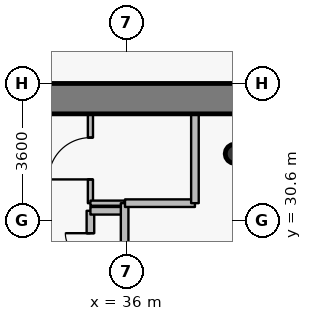
"""IFC4 building model, lengths in metres.
Left out: names, types, materials, properties, quantities, classifications, styles, units other than length and angle.
Written with IfcOpenShell. Run it as: python <this file> out.ifc"""

import sys

from ifc_helpers import new_model, si_unit, direction, frame, frame_2d, origin, origin_2d, place, context, subcontext, project, spatial, rectangle, hollow_circle, extrude, source, transform, mapped, element, fill, save


model = new_model("IFC4")
c1 = context("Model", 3, precision=1e-05, world=origin(), true_north=direction((0.0, 1.0)))
c2 = subcontext(c1, "Body", "Model", "MODEL_VIEW")
j1 = project(units=[si_unit("LENGTHUNIT", "METRE"), si_unit("PLANEANGLEUNIT", "RADIAN")], contexts=[c1])
p1 = place(None, origin())
s1 = spatial("IfcSite", under=j1, at=p1, CompositionType="ELEMENT")
p2 = place(p1, origin())
s2 = spatial("IfcBuilding", under=s1, at=p2, CompositionType="ELEMENT")
p3 = place(p2, frame((0.0, 0.0, 119.7)))
s3 = spatial("IfcBuildingStorey", under=s2, at=p3, CompositionType="ELEMENT", Elevation=119.7)
p4 = place(p3, frame((38.85, 32.35, 0.0), z_axis=(0.0, 0.0, 1.0), x_axis=(1.0, 0.0, 0.0)))
e1 = element("IfcColumn", 1, at=p4, inside=s3, PredefinedType="COLUMN", context=c2, shape_type="SweptSolid", body=[
    extrude(hollow_circle(Radius=0.254, WallThickness=0.02, at=origin_2d()), origin(), (0.0, 0.0, 1.0), 3.75),
])
p5 = place(p3, frame((26.6, 33.8, 0.0), z_axis=(0.0, 0.0, 1.0), x_axis=(1.0, 0.0, 0.0)))
e2 = element("IfcWall", 2, at=p5, inside=s3, PredefinedType="SHEAR", context=c2, shape_type="SweptSolid", body=[
    extrude(rectangle(XDim=18.8, YDim=0.8, at=frame_2d((9.4, 0.0))), origin(), (0.0, 0.0, 1.0), 2.95),
])
p6 = place(p3, frame((35.05, 27.25, 0.0), z_axis=(0.0, 0.0, 1.0), x_axis=(0.0, 1.0, 0.0)))
e3 = element("IfcWall", 3, at=p6, inside=s3, PredefinedType="PARTITIONING", context=c2, shape_type="SweptSolid", body=[
    extrude(rectangle(XDim=3.6, YDim=0.2, at=frame_2d((1.8, 0.0))), origin(), (0.0, 0.0, 1.0), 3.5),
])
p7 = place(p6, frame((0.59, 0.0, 0.0)))
e4 = element("IfcOpeningElement", 4, at=p7, cuts=e3, PredefinedType="OPENING", context=c2, shape_type="SweptSolid", body=[
    extrude(rectangle(XDim=0.66, YDim=2.05, at=origin_2d()), frame((0.33, 0.11, 1.025), z_axis=(0.0, -1.0, 0.0), x_axis=(1.0, 0.0, 0.0)), (0.0, 0.0, 1.0), 0.22),
])
p8 = place(p6, frame((2.35, 0.0, 0.0)))
e5 = element("IfcOpeningElement", 5, at=p8, cuts=e3, PredefinedType="OPENING", context=c2, shape_type="SweptSolid", body=[
    extrude(rectangle(XDim=0.66, YDim=2.05, at=origin_2d()), frame((0.33, 0.11, 1.025), z_axis=(0.0, -1.0, 0.0), x_axis=(1.0, 0.0, 0.0)), (0.0, 0.0, 1.0), 0.22),
])
p9 = place(p3, frame((35.05, 30.85, 0.0), z_axis=(0.0, 0.0, 1.0), x_axis=(1.0, 0.0, 0.0)))
e6 = element("IfcWall", 6, at=p9, inside=s3, PredefinedType="PARTITIONING", context=c2, shape_type="SweptSolid", body=[
    extrude(rectangle(XDim=0.9, YDim=0.2, at=frame_2d((0.45, 0.0))), origin(), (0.0, 0.0, 1.0), 3.5),
])
p10 = place(p3, frame((35.05, 31.05, 0.0), z_axis=(0.0, 0.0, 1.0), x_axis=(0.0, 1.0, 0.0)))
e7 = element("IfcWall", 7, at=p10, inside=s3, PredefinedType="PARTITIONING", context=c2, shape_type="SweptSolid", body=[
    extrude(rectangle(XDim=2.35, YDim=0.135, at=frame_2d((1.175, 0.0))), origin(), (0.0, 0.0, 1.0), 3.085),
])
p11 = place(p10, frame((0.625, 0.0, 0.0)))
e8 = element("IfcOpeningElement", 8, at=p11, cuts=e7, PredefinedType="OPENING", context=c2, shape_type="SweptSolid", body=[
    extrude(rectangle(XDim=1.1, YDim=2.15, at=origin_2d()), frame((0.55, 0.078, 1.075), z_axis=(0.0, -1.0, 0.0), x_axis=(1.0, 0.0, 0.0)), (0.0, 0.0, 1.0), 0.155),
])
p12 = place(p3, frame((35.05, 31.05, 0.0), z_axis=(0.0, 0.0, 1.0), x_axis=(1.0, 0.0, 0.0)))
e9 = element("IfcWall", 9, at=p12, inside=s3, PredefinedType="PARTITIONING", context=c2, shape_type="SweptSolid", body=[
    extrude(rectangle(XDim=0.9, YDim=0.135, at=frame_2d((0.45, 0.0))), origin(), (0.0, 0.0, 1.0), 3.5),
])
p13 = place(p3, frame((35.95, 27.25, 0.0), z_axis=(0.0, 0.0, 1.0), x_axis=(0.0, 1.0, 0.0)))
e10 = element("IfcWall", 10, at=p13, inside=s3, PredefinedType="PARTITIONING", context=c2, shape_type="SweptSolid", body=[
    extrude(rectangle(XDim=3.8, YDim=0.2, at=frame_2d((1.9, 0.0))), origin(), (0.0, 0.0, 1.0), 3.5),
])
p14 = place(p3, frame((35.96, 31.05, 0.0), z_axis=(0.0, 0.0, 1.0), x_axis=(1.0, 0.0, 0.0)))
e11 = element("IfcWall", 11, at=p14, inside=s3, PredefinedType="PARTITIONING", context=c2, shape_type="SweptSolid", body=[
    extrude(rectangle(XDim=1.84, YDim=0.2, at=frame_2d((0.92, 0.0))), origin(), (0.0, 0.0, 1.0), 3.5),
])
p15 = place(p3, frame((37.8, 31.05, 0.0), z_axis=(0.0, 0.0, 1.0), x_axis=(0.0, 1.0, 0.0)))
e12 = element("IfcWall", 12, at=p15, inside=s3, PredefinedType="PARTITIONING", context=c2, shape_type="SweptSolid", body=[
    extrude(rectangle(XDim=2.35, YDim=0.2, at=frame_2d((1.175, 0.0))), origin(), (0.0, 0.0, 1.0), 3.085),
])
m1 = source(origin(), c2, "Body", "SweptSolid", [
    extrude(rectangle(XDim=0.66, YDim=2.05, at=origin_2d()), frame((0.33, 0.025, 1.025), z_axis=(0.0, -1.0, 0.0), x_axis=(1.0, 0.0, 0.0)), (0.0, 0.0, 1.0), 0.05),
])
p16 = place(p8, origin())
e13 = element("IfcDoor", 13, at=p16, inside=s3, OperationType="SINGLE_SWING_RIGHT", PredefinedType="USERDEFINED", context=c2, shape_type="MappedRepresentation", body=[
    mapped(m1, transform((0.0, 0.0, 0.0), x_axis=(1.0, 0.0, 0.0), y_axis=(0.0, 1.0, 0.0), z_axis=(0.0, 0.0, 1.0), scale=1.0)),
])
fill(e5, e13)
m2 = source(origin(), c2, "Body", "SweptSolid", [
    extrude(rectangle(XDim=1.1, YDim=2.15, at=origin_2d()), frame((0.55, 0.025, 1.075), z_axis=(0.0, -1.0, 0.0), x_axis=(1.0, 0.0, 0.0)), (0.0, 0.0, 1.0), 0.05),
])
p17 = place(p11, origin())
e14 = element("IfcDoor", 14, at=p17, inside=s3, OperationType="SINGLE_SWING_LEFT", PredefinedType="DOOR", context=c2, shape_type="MappedRepresentation", body=[
    mapped(m2, transform((0.0, 0.0, 0.0), x_axis=(1.0, 0.0, 0.0), y_axis=(0.0, 1.0, 0.0), z_axis=(0.0, 0.0, 1.0), scale=1.0)),
])
fill(e8, e14)
save(model, sys.argv[1])
